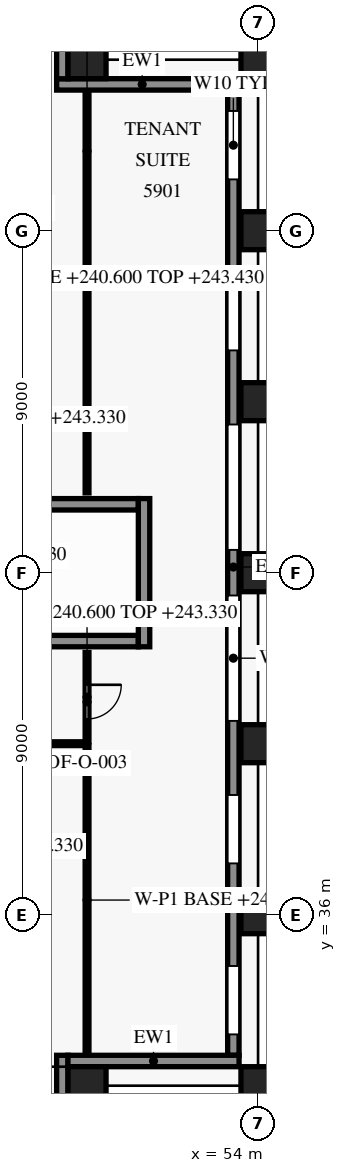
"""IFC4 building model, lengths in metres.
Left out: names, types, materials, properties, quantities, classifications, styles, units other than length and angle.
Written with IfcOpenShell. Run it as: python <this file> out.ifc"""

import sys

from ifc_helpers import new_model, si_unit, direction, frame, frame_2d, origin, origin_2d, place, context, subcontext, project, spatial, rectangle, extrude, element, fill, save


model = new_model("IFC4")
c1 = context("Model", 3, precision=1e-05, world=origin(), true_north=direction((0.0, 1.0)))
c2 = subcontext(c1, "Body", "Model", "MODEL_VIEW")
j1 = project(units=[si_unit("LENGTHUNIT", "METRE"), si_unit("PLANEANGLEUNIT", "RADIAN")], contexts=[c1])
p1 = place(None, origin())
s1 = spatial("IfcSite", under=j1, at=p1, CompositionType="ELEMENT")
p2 = place(p1, origin())
s2 = spatial("IfcBuilding", under=s1, at=p2, CompositionType="ELEMENT")
p3 = place(p2, frame((0.0, 0.0, 240.6)))
s3 = spatial("IfcBuildingStorey", under=s2, at=p3, CompositionType="ELEMENT", Elevation=240.6)
for number, where, z_axis, x_axis in (
    (1, (54.0, 31.5, 0.0), (0.0, 0.0, 1.0), (0.0, 1.0, 0.0)),
    (2, (54.0, 36.0, 0.0), (0.0, 0.0, 1.0), (0.0, 1.0, 0.0)),
    (3, (54.0, 40.5, 0.0), (0.0, 0.0, 1.0), (0.0, 1.0, 0.0)),
    (4, (54.0, 45.0, 0.0), (0.0, 0.0, 1.0), (0.0, 1.0, 0.0)),
    (5, (54.0, 49.5, 0.0), (0.0, 0.0, 1.0), (0.0, 1.0, 0.0)),
    (6, (54.0, 54.0, 0.0), (0.0, 0.0, 1.0), (0.0, 1.0, 0.0)),
    (7, (54.0, 58.5, 0.0), (0.0, 0.0, 1.0), (0.0, 1.0, 0.0)),
):
    element("IfcColumn", number, at=place(p3, frame(where, z_axis=z_axis, x_axis=x_axis)), inside=s3, PredefinedType="COLUMN", context=c2, shape_type="SweptSolid", body=[
        extrude(rectangle(XDim=0.9, YDim=1.0, at=origin_2d()), origin(), (0.0, 0.0, 1.0), 3.8),
    ])
for number, where, z_axis, x_axis in (
    (8, (49.5, 31.5, 0.0), (0.0, 0.0, 1.0), (1.0, 0.0, 0.0)),
    (9, (49.5, 58.5, 0.0), (0.0, 0.0, 1.0), (1.0, 0.0, 0.0)),
):
    element("IfcColumn", number, at=place(p3, frame(where, z_axis=z_axis, x_axis=x_axis)), inside=s3, PredefinedType="COLUMN", context=c2, shape_type="SweptSolid", body=[
        extrude(rectangle(XDim=1.0, YDim=1.0, at=origin_2d()), origin(), (0.0, 0.0, 1.0), 3.8),
    ])
p4 = place(p3, frame((48.85, 32.3, 0.0), z_axis=(0.0, 0.0, 1.0), x_axis=(0.0, -1.0, 0.0)))
e10 = element("IfcWall", 10, at=p4, inside=s3, PredefinedType="SOLIDWALL", context=c2, shape_type="SweptSolid", body=[
    extrude(rectangle(XDim=5.01, YDim=0.3, at=frame_2d((2.505, 0.0))), origin(), (0.0, 0.0, 1.0), 3.15),
])
p5 = place(p3, frame((53.5, 32.15, 0.0), z_axis=(0.0, 0.0, 1.0), x_axis=(-1.0, 0.0, 0.0)))
e11 = element("IfcWall", 11, at=p5, inside=s3, PredefinedType="SOLIDWALL", context=c2, shape_type="SweptSolid", body=[
    extrude(rectangle(XDim=4.502, YDim=0.3, at=frame_2d((2.251, 0.0))), origin(), (0.0, 0.0, 1.0), 3.15),
])
p6 = place(p3, frame((53.35, 58.0, 0.0), z_axis=(0.0, 0.0, 1.0), x_axis=(0.0, -1.0, 0.0)))
e12 = element("IfcWall", 12, at=p6, inside=s3, PredefinedType="SOLIDWALL", context=c2, shape_type="SweptSolid", body=[
    extrude(rectangle(XDim=25.702, YDim=0.3, at=frame_2d((12.851, 0.0))), origin(), (0.0, 0.0, 1.0), 3.15),
])
p7 = place(p6, frame((0.85, 0.0, 0.75)))
e13 = element("IfcOpeningElement", 13, at=p7, cuts=e12, PredefinedType="OPENING", context=c2, shape_type="SweptSolid", body=[
    extrude(rectangle(XDim=1.8, YDim=1.8, at=frame_2d((0.9, 0.9))), frame((0.0, 0.16, 0.0), z_axis=(0.0, -1.0, 0.0), x_axis=(1.0, 0.0, 0.0)), (0.0, 0.0, 1.0), 0.32),
])
p8 = place(p6, frame((5.35, 0.0, 0.75)))
e14 = element("IfcOpeningElement", 14, at=p8, cuts=e12, PredefinedType="OPENING", context=c2, shape_type="SweptSolid", body=[
    extrude(rectangle(XDim=1.8, YDim=1.8, at=frame_2d((0.9, 0.9))), frame((0.0, 0.16, 0.0), z_axis=(0.0, -1.0, 0.0), x_axis=(1.0, 0.0, 0.0)), (0.0, 0.0, 1.0), 0.32),
])
p9 = place(p6, frame((9.1, 0.0, 0.15)))
e15 = element("IfcOpeningElement", 15, at=p9, cuts=e12, PredefinedType="OPENING", context=c2, shape_type="SweptSolid", body=[
    extrude(rectangle(XDim=3.3, YDim=2.4, at=frame_2d((1.65, 1.2))), frame((0.0, 0.16, 0.0), z_axis=(0.0, -1.0, 0.0), x_axis=(1.0, 0.0, 0.0)), (0.0, 0.0, 1.0), 0.32),
])
p10 = place(p6, frame((13.6, 0.0, 0.15)))
e16 = element("IfcOpeningElement", 16, at=p10, cuts=e12, PredefinedType="OPENING", context=c2, shape_type="SweptSolid", body=[
    extrude(rectangle(XDim=3.3, YDim=2.4, at=frame_2d((1.65, 1.2))), frame((0.0, 0.16, 0.0), z_axis=(0.0, -1.0, 0.0), x_axis=(1.0, 0.0, 0.0)), (0.0, 0.0, 1.0), 0.32),
])
p11 = place(p6, frame((18.85, 0.0, 0.75)))
e17 = element("IfcOpeningElement", 17, at=p11, cuts=e12, PredefinedType="OPENING", context=c2, shape_type="SweptSolid", body=[
    extrude(rectangle(XDim=1.8, YDim=1.8, at=frame_2d((0.9, 0.9))), frame((0.0, 0.16, 0.0), z_axis=(0.0, -1.0, 0.0), x_axis=(1.0, 0.0, 0.0)), (0.0, 0.0, 1.0), 0.32),
])
p12 = place(p6, frame((23.35, 0.0, 0.75)))
e18 = element("IfcOpeningElement", 18, at=p12, cuts=e12, PredefinedType="OPENING", context=c2, shape_type="SweptSolid", body=[
    extrude(rectangle(XDim=1.8, YDim=1.8, at=frame_2d((0.9, 0.9))), frame((0.0, 0.16, 0.0), z_axis=(0.0, -1.0, 0.0), x_axis=(1.0, 0.0, 0.0)), (0.0, 0.0, 1.0), 0.32),
])
p13 = place(p3, frame((48.7, 57.85, 0.0), z_axis=(0.0, 0.0, 1.0), x_axis=(1.0, 0.0, 0.0)))
e19 = element("IfcWall", 19, at=p13, inside=s3, PredefinedType="SOLIDWALL", context=c2, shape_type="SweptSolid", body=[
    extrude(rectangle(XDim=4.502, YDim=0.3, at=frame_2d((2.251, 0.0))), origin(), (0.0, 0.0, 1.0), 3.15),
])
p14 = place(p3, frame((48.85, 62.998, 0.0), z_axis=(0.0, 0.0, 1.0), x_axis=(0.0, -1.0, 0.0)))
e20 = element("IfcWall", 20, at=p14, inside=s3, PredefinedType="SOLIDWALL", context=c2, shape_type="SweptSolid", body=[
    extrude(rectangle(XDim=5.0, YDim=0.3, at=frame_2d((2.5, 0.0))), origin(), (0.0, 0.0, 1.0), 3.15),
])
p15 = place(p3, frame((43.15, 43.2, 0.0), z_axis=(0.0, 0.0, 1.0), x_axis=(1.0, 0.0, 0.0)))
e21 = element("IfcWall", 21, at=p15, inside=s3, PredefinedType="SHEAR", context=c2, shape_type="SweptSolid", body=[
    extrude(rectangle(XDim=7.7, YDim=0.3, at=frame_2d((3.85, 0.0))), origin(), (0.0, 0.0, 1.0), 3.5),
])
p16 = place(p15, frame((0.25, 0.0, 0.0)))
e22 = element("IfcOpeningElement", 22, at=p16, cuts=e21, PredefinedType="OPENING", context=c2, shape_type="SweptSolid", body=[
    extrude(rectangle(XDim=1.2, YDim=2.2, at=frame_2d((0.6, 1.1))), frame((0.0, 0.16, 0.0), z_axis=(0.0, -1.0, 0.0), x_axis=(1.0, 0.0, 0.0)), (0.0, 0.0, 1.0), 0.32),
])
p17 = place(p3, frame((43.15, 46.8, 0.0), z_axis=(0.0, 0.0, 1.0), x_axis=(1.0, 0.0, 0.0)))
e23 = element("IfcWall", 23, at=p17, inside=s3, PredefinedType="SHEAR", context=c2, shape_type="SweptSolid", body=[
    extrude(rectangle(XDim=7.7, YDim=0.3, at=frame_2d((3.85, 0.0))), origin(), (0.0, 0.0, 1.0), 3.5),
])
p18 = place(p3, frame((51.0, 43.05, 0.0), z_axis=(0.0, 0.0, 1.0), x_axis=(0.0, 1.0, 0.0)))
e24 = element("IfcWall", 24, at=p18, inside=s3, PredefinedType="SHEAR", context=c2, shape_type="SweptSolid", body=[
    extrude(rectangle(XDim=3.9, YDim=0.3, at=frame_2d((1.95, 0.0))), origin(), (0.0, 0.0, 1.0), 3.5),
])
p19 = place(p3, frame((49.5, 32.32, 0.0), z_axis=(0.0, 0.0, 1.0), x_axis=(0.0, 1.0, 0.0)))
e25 = element("IfcWall", 25, at=p19, inside=s3, PredefinedType="PARTITIONING", context=c2, shape_type="SweptSolid", body=[
    extrude(rectangle(XDim=8.13, YDim=0.1, at=frame_2d((4.065, 0.0))), origin(), (0.0, 0.0, 1.0), 2.73),
])
p20 = place(p3, frame((49.45, 40.5, 0.0), z_axis=(0.0, 0.0, 1.0), x_axis=(-1.0, 0.0, 0.0)))
e26 = element("IfcWall", 26, at=p20, inside=s3, PredefinedType="PARTITIONING", context=c2, shape_type="SweptSolid", body=[
    extrude(rectangle(XDim=13.4, YDim=0.1, at=frame_2d((6.7, 0.0))), origin(), (0.0, 0.0, 1.0), 2.73),
])
p21 = place(p20, frame((8.05, 0.0, 0.0)))
e27 = element("IfcOpeningElement", 27, at=p21, cuts=e26, PredefinedType="OPENING", context=c2, shape_type="SweptSolid", body=[
    extrude(rectangle(XDim=1.8, YDim=2.1, at=frame_2d((0.9, 1.05))), frame((0.0, 0.06, 0.0), z_axis=(0.0, -1.0, 0.0), x_axis=(1.0, 0.0, 0.0)), (0.0, 0.0, 1.0), 0.12),
])
p22 = place(p3, frame((49.5, 42.9, 0.0), z_axis=(0.0, 0.0, 1.0), x_axis=(0.0, -1.0, 0.0)))
e28 = element("IfcWall", 28, at=p22, inside=s3, PredefinedType="PARTITIONING", context=c2, shape_type="SweptSolid", body=[
    extrude(rectangle(XDim=2.35, YDim=0.1, at=frame_2d((1.175, 0.0))), origin(), (0.0, 0.0, 1.0), 2.73),
])
p23 = place(p22, frame((0.85, 0.0, 0.0)))
e29 = element("IfcOpeningElement", 29, at=p23, cuts=e28, PredefinedType="OPENING", context=c2, shape_type="SweptSolid", body=[
    extrude(rectangle(XDim=0.9, YDim=2.1, at=frame_2d((0.45, 1.05))), frame((0.0, 0.06, 0.0), z_axis=(0.0, -1.0, 0.0), x_axis=(1.0, 0.0, 0.0)), (0.0, 0.0, 1.0), 0.12),
])
p24 = place(p3, frame((49.5, 47.1, 0.0), z_axis=(0.0, 0.0, 1.0), x_axis=(0.0, 1.0, 0.0)))
e30 = element("IfcWall", 30, at=p24, inside=s3, PredefinedType="PARTITIONING", context=c2, shape_type="SweptSolid", body=[
    extrude(rectangle(XDim=10.58, YDim=0.1, at=frame_2d((5.29, 0.0))), origin(), (0.0, 0.0, 1.0), 2.73),
])
p25 = place(p7, origin())
e31 = element("IfcWindow", 31, at=p25, inside=s3, PartitioningType="SINGLE_PANEL", PredefinedType="WINDOW", context=c2, shape_type="SweptSolid", body=[
    extrude(rectangle(XDim=1.8, YDim=1.8, at=frame_2d((0.9, 0.9))), frame((0.0, 0.03, 0.0), z_axis=(0.0, -1.0, 0.0), x_axis=(1.0, 0.0, 0.0)), (0.0, 0.0, 1.0), 0.06),
])
fill(e13, e31)
p26 = place(p8, origin())
e32 = element("IfcWindow", 32, at=p26, inside=s3, PartitioningType="SINGLE_PANEL", PredefinedType="WINDOW", context=c2, shape_type="SweptSolid", body=[
    extrude(rectangle(XDim=1.8, YDim=1.8, at=frame_2d((0.9, 0.9))), frame((0.0, 0.03, 0.0), z_axis=(0.0, -1.0, 0.0), x_axis=(1.0, 0.0, 0.0)), (0.0, 0.0, 1.0), 0.06),
])
fill(e14, e32)
p27 = place(p9, origin())
e33 = element("IfcWindow", 33, at=p27, inside=s3, PartitioningType="SINGLE_PANEL", PredefinedType="WINDOW", context=c2, shape_type="SweptSolid", body=[
    extrude(rectangle(XDim=3.3, YDim=2.4, at=frame_2d((1.65, 1.2))), frame((0.0, 0.03, 0.0), z_axis=(0.0, -1.0, 0.0), x_axis=(1.0, 0.0, 0.0)), (0.0, 0.0, 1.0), 0.06),
])
fill(e15, e33)
p28 = place(p10, origin())
e34 = element("IfcWindow", 34, at=p28, inside=s3, PartitioningType="SINGLE_PANEL", PredefinedType="WINDOW", context=c2, shape_type="SweptSolid", body=[
    extrude(rectangle(XDim=3.3, YDim=2.4, at=frame_2d((1.65, 1.2))), frame((0.0, 0.03, 0.0), z_axis=(0.0, -1.0, 0.0), x_axis=(1.0, 0.0, 0.0)), (0.0, 0.0, 1.0), 0.06),
])
fill(e16, e34)
p29 = place(p11, origin())
e35 = element("IfcWindow", 35, at=p29, inside=s3, PartitioningType="SINGLE_PANEL", PredefinedType="WINDOW", context=c2, shape_type="SweptSolid", body=[
    extrude(rectangle(XDim=1.8, YDim=1.8, at=frame_2d((0.9, 0.9))), frame((0.0, 0.03, 0.0), z_axis=(0.0, -1.0, 0.0), x_axis=(1.0, 0.0, 0.0)), (0.0, 0.0, 1.0), 0.06),
])
fill(e17, e35)
p30 = place(p12, origin())
e36 = element("IfcWindow", 36, at=p30, inside=s3, PartitioningType="SINGLE_PANEL", PredefinedType="WINDOW", context=c2, shape_type="SweptSolid", body=[
    extrude(rectangle(XDim=1.8, YDim=1.8, at=frame_2d((0.9, 0.9))), frame((0.0, 0.03, 0.0), z_axis=(0.0, -1.0, 0.0), x_axis=(1.0, 0.0, 0.0)), (0.0, 0.0, 1.0), 0.06),
])
fill(e18, e36)
p31 = place(p23, origin())
e37 = element("IfcDoor", 37, at=p31, inside=s3, OperationType="SINGLE_SWING_LEFT", PredefinedType="DOOR", context=c2, shape_type="SweptSolid", body=[
    extrude(rectangle(XDim=0.9, YDim=2.1, at=frame_2d((0.45, 1.05))), frame((0.0, 0.025, 0.0), z_axis=(0.0, -1.0, 0.0), x_axis=(1.0, 0.0, 0.0)), (0.0, 0.0, 1.0), 0.05),
])
fill(e29, e37)
save(model, sys.argv[1])
